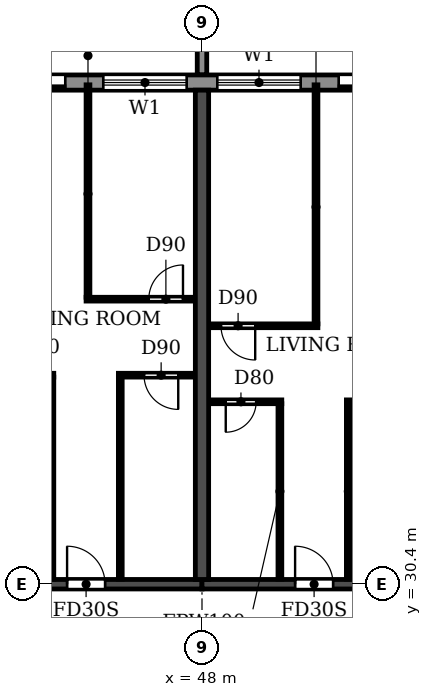
"""IFC4 building model, lengths in metres.
Left out: names, types, materials, properties, quantities, classifications, styles, units other than length and angle.
Written with IfcOpenShell. Run it as: python <this file> out.ifc"""

import sys

from ifc_helpers import new_model, si_unit, direction, frame, frame_2d, origin, place, context, subcontext, project, spatial, polyline, rectangle, outline, extrude, source, transform, mapped, element, fill, save


model = new_model("IFC4")
c1 = context("Model", 3, precision=1e-05, world=origin(), true_north=direction((0.0, 1.0)))
c2 = subcontext(c1, "Body", "Model", "MODEL_VIEW")
j1 = project(units=[si_unit("LENGTHUNIT", "METRE"), si_unit("PLANEANGLEUNIT", "RADIAN")], contexts=[c1])
p1 = place(None, origin())
s1 = spatial("IfcSite", under=j1, at=p1, CompositionType="ELEMENT")
p2 = place(p1, origin())
s2 = spatial("IfcBuilding", under=s1, at=p2, CompositionType="ELEMENT")
p3 = place(p2, frame((0.0, 0.0, 72.9)))
s3 = spatial("IfcBuildingStorey", under=s2, at=p3, CompositionType="ELEMENT", Elevation=72.9)
p4 = place(p3, frame((48.0, 30.525, 0.0), z_axis=(0.0, 0.0, 1.0), x_axis=(0.0, 1.0, 0.0)))
e1 = element("IfcWall", 1, at=p4, inside=s3, PredefinedType="SHEAR", context=c2, shape_type="SweptSolid", body=[
    extrude(rectangle(XDim=12.875, YDim=0.35, at=frame_2d((6.438, 0.0))), origin(), (0.0, 0.0, 1.0), 3.06),
])
p5 = place(p3, frame((42.0, 30.4, 0.0), z_axis=(0.0, 0.0, 1.0), x_axis=(1.0, 0.0, 0.0)))
e2 = element("IfcWall", 2, at=p5, inside=s3, PredefinedType="SHEAR", context=c2, shape_type="SweptSolid", body=[
    extrude(rectangle(XDim=6.0, YDim=0.25, at=frame_2d((3.0, 0.0))), origin(), (0.0, 0.0, 1.0), 2.46),
])
p6 = place(p5, frame((2.45, 0.0, 0.0)))
e3 = element("IfcOpeningElement", 3, at=p6, cuts=e2, PredefinedType="OPENING", context=c2, shape_type="SweptSolid", body=[
    extrude(rectangle(XDim=1.0, YDim=2.1, at=frame_2d((0.5, 1.05))), frame((0.0, 0.135, 0.0), z_axis=(0.0, -1.0, 0.0), x_axis=(1.0, 0.0, 0.0)), (0.0, 0.0, 1.0), 0.27),
])
p7 = place(p3, frame((48.0, 30.4, 0.0), z_axis=(0.0, 0.0, 1.0), x_axis=(1.0, 0.0, 0.0)))
e4 = element("IfcWall", 4, at=p7, inside=s3, PredefinedType="SHEAR", context=c2, shape_type="SweptSolid", body=[
    extrude(rectangle(XDim=6.0, YDim=0.25, at=frame_2d((3.0, 0.0))), origin(), (0.0, 0.0, 1.0), 2.46),
])
p8 = place(p7, frame((2.45, 0.0, 0.0)))
e5 = element("IfcOpeningElement", 5, at=p8, cuts=e4, PredefinedType="OPENING", context=c2, shape_type="SweptSolid", body=[
    extrude(rectangle(XDim=1.0, YDim=2.1, at=frame_2d((0.5, 1.05))), frame((0.0, 0.135, 0.0), z_axis=(0.0, -1.0, 0.0), x_axis=(1.0, 0.0, 0.0)), (0.0, 0.0, 1.0), 0.27),
])
p9 = place(p3, frame((91.317, 43.6, 0.0), z_axis=(0.0, 0.0, 1.0), x_axis=(-1.0, 0.0, 0.0)))
e6 = element("IfcWall", 6, at=p9, inside=s3, PredefinedType="STANDARD", context=c2, shape_type="SweptSolid", body=[
    extrude(rectangle(XDim=80.634, YDim=0.4, at=frame_2d((40.317, 0.0))), origin(), (0.0, 0.0, 1.0), 3.06),
])
p10 = place(p9, frame((76.717, 0.0, 0.9)))
e7 = element("IfcOpeningElement", 7, at=p10, cuts=e6, PredefinedType="OPENING", context=c2, shape_type="SweptSolid", body=[
    extrude(rectangle(XDim=2.2, YDim=1.5, at=frame_2d((1.1, 0.75))), frame((0.0, 0.21, 0.0), z_axis=(0.0, -1.0, 0.0), x_axis=(1.0, 0.0, 0.0)), (0.0, 0.0, 1.0), 0.42),
])
p11 = place(p9, frame((73.917, 0.0, 0.0)))
e8 = element("IfcOpeningElement", 8, at=p11, cuts=e6, PredefinedType="OPENING", context=c2, shape_type="SweptSolid", body=[
    extrude(rectangle(XDim=1.8, YDim=2.4, at=frame_2d((0.9, 1.2))), frame((0.0, 0.21, 0.0), z_axis=(0.0, -1.0, 0.0), x_axis=(1.0, 0.0, 0.0)), (0.0, 0.0, 1.0), 0.42),
])
p12 = place(p9, frame((70.917, 0.0, 0.0)))
e9 = element("IfcOpeningElement", 9, at=p12, cuts=e6, PredefinedType="OPENING", context=c2, shape_type="SweptSolid", body=[
    extrude(rectangle(XDim=1.8, YDim=2.4, at=frame_2d((0.9, 1.2))), frame((0.0, 0.21, 0.0), z_axis=(0.0, -1.0, 0.0), x_axis=(1.0, 0.0, 0.0)), (0.0, 0.0, 1.0), 0.42),
])
p13 = place(p9, frame((67.717, 0.0, 0.9)))
e10 = element("IfcOpeningElement", 10, at=p13, cuts=e6, PredefinedType="OPENING", context=c2, shape_type="SweptSolid", body=[
    extrude(rectangle(XDim=2.2, YDim=1.5, at=frame_2d((1.1, 0.75))), frame((0.0, 0.21, 0.0), z_axis=(0.0, -1.0, 0.0), x_axis=(1.0, 0.0, 0.0)), (0.0, 0.0, 1.0), 0.42),
])
p14 = place(p9, frame((64.717, 0.0, 0.9)))
e11 = element("IfcOpeningElement", 11, at=p14, cuts=e6, PredefinedType="OPENING", context=c2, shape_type="SweptSolid", body=[
    extrude(rectangle(XDim=2.2, YDim=1.5, at=frame_2d((1.1, 0.75))), frame((0.0, 0.21, 0.0), z_axis=(0.0, -1.0, 0.0), x_axis=(1.0, 0.0, 0.0)), (0.0, 0.0, 1.0), 0.42),
])
p15 = place(p9, frame((61.917, 0.0, 0.0)))
e12 = element("IfcOpeningElement", 12, at=p15, cuts=e6, PredefinedType="OPENING", context=c2, shape_type="SweptSolid", body=[
    extrude(rectangle(XDim=1.8, YDim=2.4, at=frame_2d((0.9, 1.2))), frame((0.0, 0.21, 0.0), z_axis=(0.0, -1.0, 0.0), x_axis=(1.0, 0.0, 0.0)), (0.0, 0.0, 1.0), 0.42),
])
p16 = place(p9, frame((58.717, 0.0, 0.9)))
e13 = element("IfcOpeningElement", 13, at=p16, cuts=e6, PredefinedType="OPENING", context=c2, shape_type="SweptSolid", body=[
    extrude(rectangle(XDim=2.2, YDim=1.5, at=frame_2d((1.1, 0.75))), frame((0.0, 0.21, 0.0), z_axis=(0.0, -1.0, 0.0), x_axis=(1.0, 0.0, 0.0)), (0.0, 0.0, 1.0), 0.42),
])
p17 = place(p9, frame((55.917, 0.0, 0.0)))
e14 = element("IfcOpeningElement", 14, at=p17, cuts=e6, PredefinedType="OPENING", context=c2, shape_type="SweptSolid", body=[
    extrude(rectangle(XDim=1.8, YDim=2.4, at=frame_2d((0.9, 1.2))), frame((0.0, 0.21, 0.0), z_axis=(0.0, -1.0, 0.0), x_axis=(1.0, 0.0, 0.0)), (0.0, 0.0, 1.0), 0.42),
])
p18 = place(p9, frame((52.717, 0.0, 0.9)))
e15 = element("IfcOpeningElement", 15, at=p18, cuts=e6, PredefinedType="OPENING", context=c2, shape_type="SweptSolid", body=[
    extrude(rectangle(XDim=2.2, YDim=1.5, at=frame_2d((1.1, 0.75))), frame((0.0, 0.21, 0.0), z_axis=(0.0, -1.0, 0.0), x_axis=(1.0, 0.0, 0.0)), (0.0, 0.0, 1.0), 0.42),
])
p19 = place(p9, frame((49.717, 0.0, 0.9)))
e16 = element("IfcOpeningElement", 16, at=p19, cuts=e6, PredefinedType="OPENING", context=c2, shape_type="SweptSolid", body=[
    extrude(rectangle(XDim=2.2, YDim=1.5, at=frame_2d((1.1, 0.75))), frame((0.0, 0.21, 0.0), z_axis=(0.0, -1.0, 0.0), x_axis=(1.0, 0.0, 0.0)), (0.0, 0.0, 1.0), 0.42),
])
p20 = place(p9, frame((46.917, 0.0, 0.0)))
e17 = element("IfcOpeningElement", 17, at=p20, cuts=e6, PredefinedType="OPENING", context=c2, shape_type="SweptSolid", body=[
    extrude(rectangle(XDim=1.8, YDim=2.4, at=frame_2d((0.9, 1.2))), frame((0.0, 0.21, 0.0), z_axis=(0.0, -1.0, 0.0), x_axis=(1.0, 0.0, 0.0)), (0.0, 0.0, 1.0), 0.42),
])
p21 = place(p9, frame((43.717, 0.0, 0.9)))
e18 = element("IfcOpeningElement", 18, at=p21, cuts=e6, PredefinedType="OPENING", context=c2, shape_type="SweptSolid", body=[
    extrude(rectangle(XDim=2.2, YDim=1.5, at=frame_2d((1.1, 0.75))), frame((0.0, 0.21, 0.0), z_axis=(0.0, -1.0, 0.0), x_axis=(1.0, 0.0, 0.0)), (0.0, 0.0, 1.0), 0.42),
])
p22 = place(p9, frame((40.717, 0.0, 0.9)))
e19 = element("IfcOpeningElement", 19, at=p22, cuts=e6, PredefinedType="OPENING", context=c2, shape_type="SweptSolid", body=[
    extrude(rectangle(XDim=2.2, YDim=1.5, at=frame_2d((1.1, 0.75))), frame((0.0, 0.21, 0.0), z_axis=(0.0, -1.0, 0.0), x_axis=(1.0, 0.0, 0.0)), (0.0, 0.0, 1.0), 0.42),
])
p23 = place(p9, frame((37.917, 0.0, 0.0)))
e20 = element("IfcOpeningElement", 20, at=p23, cuts=e6, PredefinedType="OPENING", context=c2, shape_type="SweptSolid", body=[
    extrude(rectangle(XDim=1.8, YDim=2.4, at=frame_2d((0.9, 1.2))), frame((0.0, 0.21, 0.0), z_axis=(0.0, -1.0, 0.0), x_axis=(1.0, 0.0, 0.0)), (0.0, 0.0, 1.0), 0.42),
])
p24 = place(p9, frame((34.717, 0.0, 0.9)))
e21 = element("IfcOpeningElement", 21, at=p24, cuts=e6, PredefinedType="OPENING", context=c2, shape_type="SweptSolid", body=[
    extrude(rectangle(XDim=2.2, YDim=1.5, at=frame_2d((1.1, 0.75))), frame((0.0, 0.21, 0.0), z_axis=(0.0, -1.0, 0.0), x_axis=(1.0, 0.0, 0.0)), (0.0, 0.0, 1.0), 0.42),
])
p25 = place(p9, frame((31.917, 0.0, 0.0)))
e22 = element("IfcOpeningElement", 22, at=p25, cuts=e6, PredefinedType="OPENING", context=c2, shape_type="SweptSolid", body=[
    extrude(rectangle(XDim=1.8, YDim=2.4, at=frame_2d((0.9, 1.2))), frame((0.0, 0.21, 0.0), z_axis=(0.0, -1.0, 0.0), x_axis=(1.0, 0.0, 0.0)), (0.0, 0.0, 1.0), 0.42),
])
p26 = place(p9, frame((28.717, 0.0, 0.9)))
e23 = element("IfcOpeningElement", 23, at=p26, cuts=e6, PredefinedType="OPENING", context=c2, shape_type="SweptSolid", body=[
    extrude(rectangle(XDim=2.2, YDim=1.5, at=frame_2d((1.1, 0.75))), frame((0.0, 0.21, 0.0), z_axis=(0.0, -1.0, 0.0), x_axis=(1.0, 0.0, 0.0)), (0.0, 0.0, 1.0), 0.42),
])
p27 = place(p9, frame((25.717, 0.0, 0.9)))
e24 = element("IfcOpeningElement", 24, at=p27, cuts=e6, PredefinedType="OPENING", context=c2, shape_type="SweptSolid", body=[
    extrude(rectangle(XDim=2.2, YDim=1.5, at=frame_2d((1.1, 0.75))), frame((0.0, 0.21, 0.0), z_axis=(0.0, -1.0, 0.0), x_axis=(1.0, 0.0, 0.0)), (0.0, 0.0, 1.0), 0.42),
])
p28 = place(p9, frame((22.717, 0.0, 0.9)))
e25 = element("IfcOpeningElement", 25, at=p28, cuts=e6, PredefinedType="OPENING", context=c2, shape_type="SweptSolid", body=[
    extrude(rectangle(XDim=2.2, YDim=1.5, at=frame_2d((1.1, 0.75))), frame((0.0, 0.21, 0.0), z_axis=(0.0, -1.0, 0.0), x_axis=(1.0, 0.0, 0.0)), (0.0, 0.0, 1.0), 0.42),
])
p29 = place(p9, frame((19.917, 0.0, 0.0)))
e26 = element("IfcOpeningElement", 26, at=p29, cuts=e6, PredefinedType="OPENING", context=c2, shape_type="SweptSolid", body=[
    extrude(rectangle(XDim=1.8, YDim=2.4, at=frame_2d((0.9, 1.2))), frame((0.0, 0.21, 0.0), z_axis=(0.0, -1.0, 0.0), x_axis=(1.0, 0.0, 0.0)), (0.0, 0.0, 1.0), 0.42),
])
p30 = place(p9, frame((16.717, 0.0, 0.9)))
e27 = element("IfcOpeningElement", 27, at=p30, cuts=e6, PredefinedType="OPENING", context=c2, shape_type="SweptSolid", body=[
    extrude(rectangle(XDim=2.2, YDim=1.5, at=frame_2d((1.1, 0.75))), frame((0.0, 0.21, 0.0), z_axis=(0.0, -1.0, 0.0), x_axis=(1.0, 0.0, 0.0)), (0.0, 0.0, 1.0), 0.42),
])
p31 = place(p9, frame((13.717, 0.0, 0.9)))
e28 = element("IfcOpeningElement", 28, at=p31, cuts=e6, PredefinedType="OPENING", context=c2, shape_type="SweptSolid", body=[
    extrude(rectangle(XDim=2.2, YDim=1.5, at=frame_2d((1.1, 0.75))), frame((0.0, 0.21, 0.0), z_axis=(0.0, -1.0, 0.0), x_axis=(1.0, 0.0, 0.0)), (0.0, 0.0, 1.0), 0.42),
])
p32 = place(p9, frame((10.717, 0.0, 0.9)))
e29 = element("IfcOpeningElement", 29, at=p32, cuts=e6, PredefinedType="OPENING", context=c2, shape_type="SweptSolid", body=[
    extrude(rectangle(XDim=2.2, YDim=1.5, at=frame_2d((1.1, 0.75))), frame((0.0, 0.21, 0.0), z_axis=(0.0, -1.0, 0.0), x_axis=(1.0, 0.0, 0.0)), (0.0, 0.0, 1.0), 0.42),
])
p33 = place(p9, frame((7.917, 0.0, 0.0)))
e30 = element("IfcOpeningElement", 30, at=p33, cuts=e6, PredefinedType="OPENING", context=c2, shape_type="SweptSolid", body=[
    extrude(rectangle(XDim=1.8, YDim=2.4, at=frame_2d((0.9, 1.2))), frame((0.0, 0.21, 0.0), z_axis=(0.0, -1.0, 0.0), x_axis=(1.0, 0.0, 0.0)), (0.0, 0.0, 1.0), 0.42),
])
p34 = place(p9, frame((4.717, 0.0, 0.9)))
e31 = element("IfcOpeningElement", 31, at=p34, cuts=e6, PredefinedType="OPENING", context=c2, shape_type="SweptSolid", body=[
    extrude(rectangle(XDim=2.2, YDim=1.5, at=frame_2d((1.1, 0.75))), frame((0.0, 0.21, 0.0), z_axis=(0.0, -1.0, 0.0), x_axis=(1.0, 0.0, 0.0)), (0.0, 0.0, 1.0), 0.42),
])
p35 = place(p9, frame((1.917, 0.0, 0.0)))
e32 = element("IfcOpeningElement", 32, at=p35, cuts=e6, PredefinedType="OPENING", context=c2, shape_type="SweptSolid", body=[
    extrude(rectangle(XDim=1.8, YDim=2.4, at=frame_2d((0.9, 1.2))), frame((0.0, 0.21, 0.0), z_axis=(0.0, -1.0, 0.0), x_axis=(1.0, 0.0, 0.0)), (0.0, 0.0, 1.0), 0.42),
])
m1 = source(origin(), c2, "Body", "SweptSolid", [
    extrude(outline(polyline([(0.0, 0.0), (0.25, 0.0), (0.25, 3.1), (0.0, 3.1), (0.0, 0.0)])), origin(), (0.0, 0.0, 1.0), 3.1),
])
p36 = place(p3, frame((47.875, 43.8, 0.0)))
e33 = element("IfcWall", 33, at=p36, inside=s3, PredefinedType="STANDARD", context=c2, shape_type="MappedRepresentation", body=[
    mapped(m1, transform((0.0, 0.0, 0.0))),
])
p37 = place(p3, frame((48.185, 35.2, 0.0), z_axis=(0.0, 0.0, 1.0), x_axis=(1.0, 0.0, 0.0)))
e34 = element("IfcWall", 34, at=p37, inside=s3, PredefinedType="PARTITIONING", context=c2, shape_type="SweptSolid", body=[
    extrude(rectangle(XDim=1.915, YDim=0.1, at=frame_2d((0.958, 0.0))), origin(), (0.0, 0.0, 1.0), 3.06),
])
p38 = place(p37, frame((0.44, 0.0, 0.0)))
e35 = element("IfcOpeningElement", 35, at=p38, cuts=e34, PredefinedType="OPENING", context=c2, shape_type="SweptSolid", body=[
    extrude(rectangle(XDim=0.8, YDim=2.1, at=frame_2d((0.4, 1.05))), frame((0.0, 0.06, 0.0), z_axis=(0.0, -1.0, 0.0), x_axis=(1.0, 0.0, 0.0)), (0.0, 0.0, 1.0), 0.12),
])
p39 = place(p3, frame((51.8, 35.2, 0.0), z_axis=(0.0, 0.0, 1.0), x_axis=(1.0, 0.0, 0.0)))
e36 = element("IfcWall", 36, at=p39, inside=s3, PredefinedType="PARTITIONING", context=c2, shape_type="SweptSolid", body=[
    extrude(rectangle(XDim=2.015, YDim=0.1, at=frame_2d((1.007, 0.0))), origin(), (0.0, 0.0, 1.0), 3.06),
])
p40 = place(p39, frame((0.675, 0.0, 0.0)))
e37 = element("IfcOpeningElement", 37, at=p40, cuts=e36, PredefinedType="OPENING", context=c2, shape_type="SweptSolid", body=[
    extrude(rectangle(XDim=0.9, YDim=2.1, at=frame_2d((0.45, 1.05))), frame((0.0, 0.06, 0.0), z_axis=(0.0, -1.0, 0.0), x_axis=(1.0, 0.0, 0.0)), (0.0, 0.0, 1.0), 0.12),
])
p41 = place(p3, frame((42.185, 35.9, 0.0), z_axis=(0.0, 0.0, 1.0), x_axis=(1.0, 0.0, 0.0)))
e38 = element("IfcWall", 38, at=p41, inside=s3, PredefinedType="PARTITIONING", context=c2, shape_type="SweptSolid", body=[
    extrude(rectangle(XDim=1.915, YDim=0.1, at=frame_2d((0.958, 0.0))), origin(), (0.0, 0.0, 1.0), 3.06),
])
p42 = place(p41, frame((0.44, 0.0, 0.0)))
e39 = element("IfcOpeningElement", 39, at=p42, cuts=e38, PredefinedType="OPENING", context=c2, shape_type="SweptSolid", body=[
    extrude(rectangle(XDim=0.8, YDim=2.1, at=frame_2d((0.4, 1.05))), frame((0.0, 0.06, 0.0), z_axis=(0.0, -1.0, 0.0), x_axis=(1.0, 0.0, 0.0)), (0.0, 0.0, 1.0), 0.12),
])
p43 = place(p3, frame((45.8, 35.9, 0.0), z_axis=(0.0, 0.0, 1.0), x_axis=(1.0, 0.0, 0.0)))
e40 = element("IfcWall", 40, at=p43, inside=s3, PredefinedType="PARTITIONING", context=c2, shape_type="SweptSolid", body=[
    extrude(rectangle(XDim=2.015, YDim=0.1, at=frame_2d((1.007, 0.0))), origin(), (0.0, 0.0, 1.0), 3.06),
])
p44 = place(p43, frame((0.675, 0.0, 0.0)))
e41 = element("IfcOpeningElement", 41, at=p44, cuts=e40, PredefinedType="OPENING", context=c2, shape_type="SweptSolid", body=[
    extrude(rectangle(XDim=0.9, YDim=2.1, at=frame_2d((0.45, 1.05))), frame((0.0, 0.06, 0.0), z_axis=(0.0, -1.0, 0.0), x_axis=(1.0, 0.0, 0.0)), (0.0, 0.0, 1.0), 0.12),
])
p45 = place(p3, frame((48.185, 37.2, 0.0), z_axis=(0.0, 0.0, 1.0), x_axis=(1.0, 0.0, 0.0)))
e42 = element("IfcWall", 42, at=p45, inside=s3, PredefinedType="PARTITIONING", context=c2, shape_type="SweptSolid", body=[
    extrude(rectangle(XDim=2.865, YDim=0.1, at=frame_2d((1.433, 0.0))), origin(), (0.0, 0.0, 1.0), 3.06),
])
p46 = place(p45, frame((0.315, 0.0, 0.0)))
e43 = element("IfcOpeningElement", 43, at=p46, cuts=e42, PredefinedType="OPENING", context=c2, shape_type="SweptSolid", body=[
    extrude(rectangle(XDim=0.9, YDim=2.1, at=frame_2d((0.45, 1.05))), frame((0.0, 0.06, 0.0), z_axis=(0.0, -1.0, 0.0), x_axis=(1.0, 0.0, 0.0)), (0.0, 0.0, 1.0), 0.12),
])
p47 = place(p3, frame((44.95, 37.9, 0.0), z_axis=(0.0, 0.0, 1.0), x_axis=(1.0, 0.0, 0.0)))
e44 = element("IfcWall", 44, at=p47, inside=s3, PredefinedType="PARTITIONING", context=c2, shape_type="SweptSolid", body=[
    extrude(rectangle(XDim=2.865, YDim=0.1, at=frame_2d((1.433, 0.0))), origin(), (0.0, 0.0, 1.0), 3.06),
])
p48 = place(p47, frame((1.65, 0.0, 0.0)))
e45 = element("IfcOpeningElement", 45, at=p48, cuts=e44, PredefinedType="OPENING", context=c2, shape_type="SweptSolid", body=[
    extrude(rectangle(XDim=0.9, YDim=2.1, at=frame_2d((0.45, 1.05))), frame((0.0, 0.06, 0.0), z_axis=(0.0, -1.0, 0.0), x_axis=(1.0, 0.0, 0.0)), (0.0, 0.0, 1.0), 0.12),
])
p49 = place(p3, frame((44.05, 30.535, 0.0), z_axis=(0.0, 0.0, 1.0), x_axis=(0.0, 1.0, 0.0)))
e46 = element("IfcWall", 46, at=p49, inside=s3, PredefinedType="PARTITIONING", context=c2, shape_type="SweptSolid", body=[
    extrude(rectangle(XDim=5.315, YDim=0.1, at=frame_2d((2.658, 0.0))), origin(), (0.0, 0.0, 1.0), 3.06),
])
p50 = place(p3, frame((45.0, 37.95, 0.0), z_axis=(0.0, 0.0, 1.0), x_axis=(0.0, 1.0, 0.0)))
e47 = element("IfcWall", 47, at=p50, inside=s3, PredefinedType="PARTITIONING", context=c2, shape_type="SweptSolid", body=[
    extrude(rectangle(XDim=5.59, YDim=0.1, at=frame_2d((2.795, 0.0))), origin(), (0.0, 0.0, 1.0), 3.06),
])
p51 = place(p3, frame((45.85, 30.535, 0.0), z_axis=(0.0, 0.0, 1.0), x_axis=(0.0, 1.0, 0.0)))
e48 = element("IfcWall", 48, at=p51, inside=s3, PredefinedType="PARTITIONING", context=c2, shape_type="SweptSolid", body=[
    extrude(rectangle(XDim=5.315, YDim=0.1, at=frame_2d((2.658, 0.0))), origin(), (0.0, 0.0, 1.0), 3.06),
])
p52 = place(p3, frame((50.05, 30.535, 0.0), z_axis=(0.0, 0.0, 1.0), x_axis=(0.0, 1.0, 0.0)))
e49 = element("IfcWall", 49, at=p52, inside=s3, PredefinedType="PARTITIONING", context=c2, shape_type="SweptSolid", body=[
    extrude(rectangle(XDim=4.615, YDim=0.1, at=frame_2d((2.308, 0.0))), origin(), (0.0, 0.0, 1.0), 3.06),
])
p53 = place(p3, frame((51.0, 37.25, 0.0), z_axis=(0.0, 0.0, 1.0), x_axis=(0.0, 1.0, 0.0)))
e50 = element("IfcWall", 50, at=p53, inside=s3, PredefinedType="PARTITIONING", context=c2, shape_type="SweptSolid", body=[
    extrude(rectangle(XDim=6.29, YDim=0.1, at=frame_2d((3.145, 0.0))), origin(), (0.0, 0.0, 1.0), 3.06),
])
p54 = place(p3, frame((51.85, 30.535, 0.0), z_axis=(0.0, 0.0, 1.0), x_axis=(0.0, 1.0, 0.0)))
e51 = element("IfcWall", 51, at=p54, inside=s3, PredefinedType="PARTITIONING", context=c2, shape_type="SweptSolid", body=[
    extrude(rectangle(XDim=4.615, YDim=0.1, at=frame_2d((2.308, 0.0))), origin(), (0.0, 0.0, 1.0), 3.06),
])
p55 = place(p20, origin())
e52 = element("IfcDoor", 52, at=p55, inside=s3, OperationType="DOUBLE_DOOR_SLIDING", PredefinedType="DOOR", context=c2, shape_type="SweptSolid", body=[
    extrude(rectangle(XDim=1.8, YDim=2.4, at=frame_2d((0.9, 1.2))), frame((0.0, 0.025, 0.0), z_axis=(0.0, -1.0, 0.0), x_axis=(1.0, 0.0, 0.0)), (0.0, 0.0, 1.0), 0.05),
])
fill(e17, e52)
p56 = place(p21, origin())
e53 = element("IfcWindow", 53, at=p56, inside=s3, PartitioningType="DOUBLE_PANEL_HORIZONTAL", PredefinedType="WINDOW", context=c2, shape_type="SweptSolid", body=[
    extrude(rectangle(XDim=2.2, YDim=1.5, at=frame_2d((1.1, 0.75))), frame((0.0, 0.03, 0.0), z_axis=(0.0, -1.0, 0.0), x_axis=(1.0, 0.0, 0.0)), (0.0, 0.0, 1.0), 0.06),
])
fill(e18, e53)
p57 = place(p22, origin())
e54 = element("IfcWindow", 54, at=p57, inside=s3, PartitioningType="DOUBLE_PANEL_HORIZONTAL", PredefinedType="WINDOW", context=c2, shape_type="SweptSolid", body=[
    extrude(rectangle(XDim=2.2, YDim=1.5, at=frame_2d((1.1, 0.75))), frame((0.0, 0.03, 0.0), z_axis=(0.0, -1.0, 0.0), x_axis=(1.0, 0.0, 0.0)), (0.0, 0.0, 1.0), 0.06),
])
fill(e19, e54)
p58 = place(p23, origin())
e55 = element("IfcDoor", 55, at=p58, inside=s3, OperationType="DOUBLE_DOOR_SLIDING", PredefinedType="DOOR", context=c2, shape_type="SweptSolid", body=[
    extrude(rectangle(XDim=1.8, YDim=2.4, at=frame_2d((0.9, 1.2))), frame((0.0, 0.025, 0.0), z_axis=(0.0, -1.0, 0.0), x_axis=(1.0, 0.0, 0.0)), (0.0, 0.0, 1.0), 0.05),
])
fill(e20, e55)
p59 = place(p6, origin())
e56 = element("IfcDoor", 56, at=p59, inside=s3, OperationType="SINGLE_SWING_LEFT", PredefinedType="DOOR", context=c2, shape_type="SweptSolid", body=[
    extrude(rectangle(XDim=1.0, YDim=2.1, at=frame_2d((0.5, 1.05))), frame((0.0, 0.025, 0.0), z_axis=(0.0, -1.0, 0.0), x_axis=(1.0, 0.0, 0.0)), (0.0, 0.0, 1.0), 0.05),
])
fill(e3, e56)
p60 = place(p44, frame((0.9, 0.0, 0.0), z_axis=(0.0, 0.0, 1.0), x_axis=(-1.0, 0.0, 0.0)))
e57 = element("IfcDoor", 57, at=p60, inside=s3, OperationType="SINGLE_SWING_LEFT", PredefinedType="DOOR", context=c2, shape_type="SweptSolid", body=[
    extrude(rectangle(XDim=0.9, YDim=2.1, at=frame_2d((0.45, 1.05))), frame((0.0, 0.025, 0.0), z_axis=(0.0, -1.0, 0.0), x_axis=(1.0, 0.0, 0.0)), (0.0, 0.0, 1.0), 0.05),
])
fill(e41, e57)
p61 = place(p48, origin())
e58 = element("IfcDoor", 58, at=p61, inside=s3, OperationType="SINGLE_SWING_RIGHT", PredefinedType="DOOR", context=c2, shape_type="SweptSolid", body=[
    extrude(rectangle(XDim=0.9, YDim=2.1, at=frame_2d((0.45, 1.05))), frame((0.0, 0.025, 0.0), z_axis=(0.0, -1.0, 0.0), x_axis=(1.0, 0.0, 0.0)), (0.0, 0.0, 1.0), 0.05),
])
fill(e45, e58)
p62 = place(p46, frame((0.9, 0.0, 0.0), z_axis=(0.0, 0.0, 1.0), x_axis=(-1.0, 0.0, 0.0)))
e59 = element("IfcDoor", 59, at=p62, inside=s3, OperationType="SINGLE_SWING_LEFT", PredefinedType="DOOR", context=c2, shape_type="SweptSolid", body=[
    extrude(rectangle(XDim=0.9, YDim=2.1, at=frame_2d((0.45, 1.05))), frame((0.0, 0.025, 0.0), z_axis=(0.0, -1.0, 0.0), x_axis=(1.0, 0.0, 0.0)), (0.0, 0.0, 1.0), 0.05),
])
fill(e43, e59)
p63 = place(p38, frame((0.8, 0.0, 0.0), z_axis=(0.0, 0.0, 1.0), x_axis=(-1.0, 0.0, 0.0)))
e60 = element("IfcDoor", 60, at=p63, inside=s3, OperationType="SINGLE_SWING_RIGHT", PredefinedType="DOOR", context=c2, shape_type="SweptSolid", body=[
    extrude(rectangle(XDim=0.8, YDim=2.1, at=frame_2d((0.4, 1.05))), frame((0.0, 0.025, 0.0), z_axis=(0.0, -1.0, 0.0), x_axis=(1.0, 0.0, 0.0)), (0.0, 0.0, 1.0), 0.05),
])
fill(e35, e60)
p64 = place(p8, origin())
e61 = element("IfcDoor", 61, at=p64, inside=s3, OperationType="SINGLE_SWING_LEFT", PredefinedType="DOOR", context=c2, shape_type="SweptSolid", body=[
    extrude(rectangle(XDim=1.0, YDim=2.1, at=frame_2d((0.5, 1.05))), frame((0.0, 0.025, 0.0), z_axis=(0.0, -1.0, 0.0), x_axis=(1.0, 0.0, 0.0)), (0.0, 0.0, 1.0), 0.05),
])
fill(e5, e61)
save(model, sys.argv[1])
